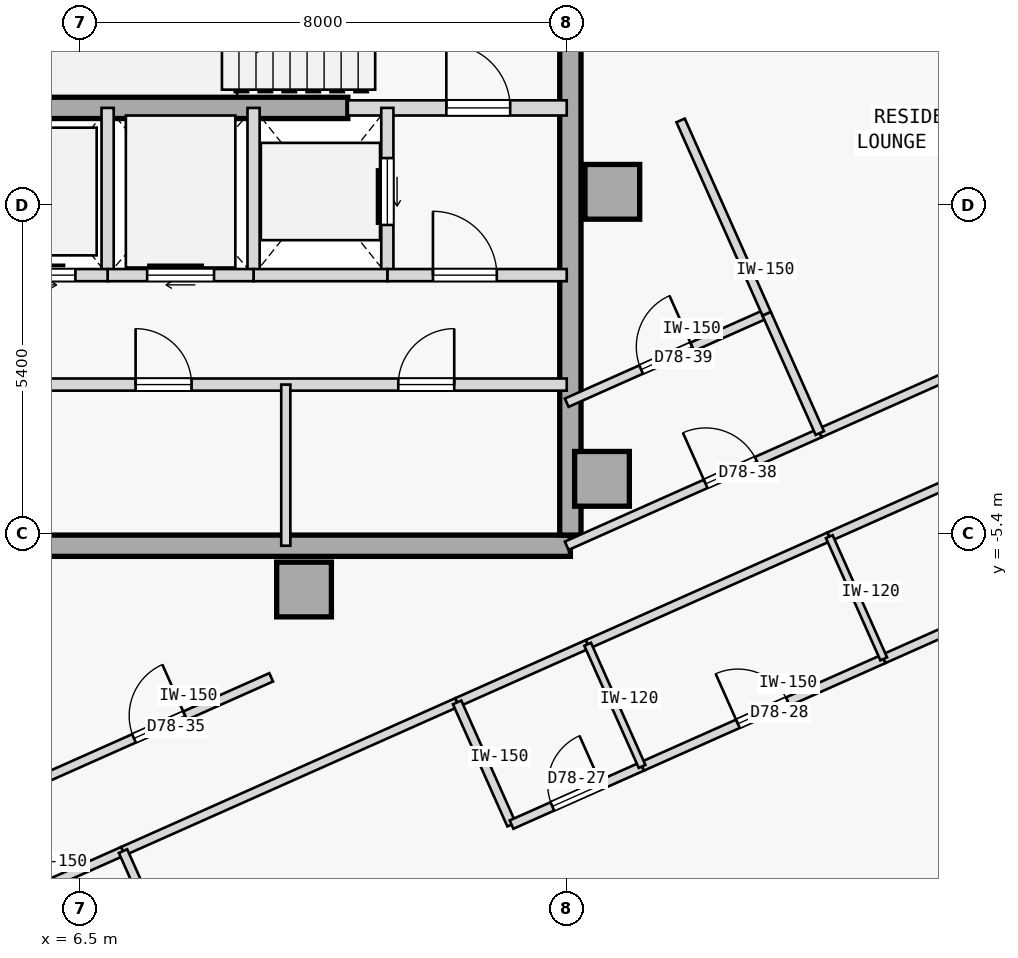
"""IFC4 building model, lengths in metres.
Left out: names, types, materials, properties, quantities, classifications, styles, units other than length and angle.
Written with IfcOpenShell. Run it as: python <this file> out.ifc"""

import sys

from ifc_helpers import new_model, si_unit, direction, frame, frame_2d, origin, origin_2d, place, context, subcontext, project, spatial, rectangle, extrude, element, fill, save


model = new_model("IFC4")
c1 = context("Model", 3, precision=1e-05, world=origin(), true_north=direction((0.0, 1.0)))
c2 = subcontext(c1, "Body", "Model", "MODEL_VIEW")
j1 = project(units=[si_unit("LENGTHUNIT", "METRE"), si_unit("PLANEANGLEUNIT", "RADIAN")], contexts=[c1])
p1 = place(None, origin())
s1 = spatial("IfcSite", under=j1, at=p1, CompositionType="ELEMENT")
p2 = place(p1, origin())
s2 = spatial("IfcBuilding", under=s1, at=p2, CompositionType="ELEMENT")
p3 = place(p2, frame((0.0, 0.0, 291.95)))
s3 = spatial("IfcBuildingStorey", under=s2, at=p3, CompositionType="ELEMENT", Elevation=291.95)
for number, where, z_axis, x_axis in (
    (1, (15.25, 0.22, 0.0), (0.0, 0.0, 1.0), (1.0, 0.0, 0.0)),
    (2, (15.08, -4.5, 0.0), (0.0, 0.0, 1.0), (1.0, 0.0, 0.0)),
    (3, (10.18, -6.32, 0.0), (0.0, 0.0, 1.0), (1.0, 0.0, 0.0)),
):
    element("IfcColumn", number, at=place(p3, frame(where, z_axis=z_axis, x_axis=x_axis)), inside=s3, PredefinedType="COLUMN", context=c2, shape_type="SweptSolid", body=[
        extrude(rectangle(XDim=0.9, YDim=0.9, at=origin_2d()), origin(), (0.0, 0.0, 1.0), 3.35),
    ])
p4 = place(p3, frame((3.7, -5.6, 0.0), z_axis=(0.0, 0.0, 1.0), x_axis=(1.0, 0.0, 0.0)))
e4 = element("IfcWall", 4, at=p4, inside=s3, PredefinedType="SHEAR", context=c2, shape_type="SweptSolid", body=[
    extrude(rectangle(XDim=10.86, YDim=0.35, at=frame_2d((5.43, 0.0))), origin(), (0.0, 0.0, 1.0), 3.125),
])
p5 = place(p3, frame((14.56, -5.425, 0.0), z_axis=(0.0, 0.0, 1.0), x_axis=(0.0, 1.0, 0.0)))
e5 = element("IfcWall", 5, at=p5, inside=s3, PredefinedType="SHEAR", context=c2, shape_type="SweptSolid", body=[
    extrude(rectangle(XDim=10.85, YDim=0.35, at=frame_2d((5.425, 0.0))), origin(), (0.0, 0.0, 1.0), 3.125),
])
p6 = place(p3, frame((5.75, 1.6, 0.0), z_axis=(0.0, 0.0, 1.0), x_axis=(1.0, 0.0, 0.0)))
e6 = element("IfcWall", 6, at=p6, inside=s3, PredefinedType="SHEAR", context=c2, shape_type="SweptSolid", body=[
    extrude(rectangle(XDim=5.15, YDim=0.35, at=frame_2d((2.575, 0.0))), origin(), (0.0, 0.0, 1.0), 3.125),
])
p7 = place(p3, frame((10.9, 1.6, 0.0), z_axis=(0.0, 0.0, 1.0), x_axis=(1.0, 0.0, 0.0)))
e7 = element("IfcWall", 7, at=p7, inside=s3, PredefinedType="STANDARD", context=c2, shape_type="SweptSolid", body=[
    extrude(rectangle(XDim=3.6, YDim=0.25, at=frame_2d((1.8, 0.0))), origin(), (0.0, 0.0, 1.0), 3.125),
])
p8 = place(p7, frame((1.62, 0.0, 0.0)))
e8 = element("IfcOpeningElement", 8, at=p8, cuts=e7, PredefinedType="OPENING", context=c2, shape_type="SweptSolid", body=[
    extrude(rectangle(XDim=1.05, YDim=2.15, at=frame_2d((0.525, 1.075))), frame((0.0, 0.135, 0.0), z_axis=(0.0, -1.0, 0.0), x_axis=(1.0, 0.0, 0.0)), (0.0, 0.0, 1.0), 0.27),
])
p9 = place(p3, frame((11.55, -1.15, 0.0), z_axis=(0.0, 0.0, 1.0), x_axis=(0.0, 1.0, 0.0)))
e9 = element("IfcWall", 9, at=p9, inside=s3, PredefinedType="STANDARD", context=c2, shape_type="SweptSolid", body=[
    extrude(rectangle(XDim=2.75, YDim=0.2, at=frame_2d((1.375, 0.0))), origin(), (0.0, 0.0, 1.0), 3.125),
])
p10 = place(p9, frame((0.825, 0.0, 0.0)))
e10 = element("IfcOpeningElement", 10, at=p10, cuts=e9, PredefinedType="OPENING", context=c2, shape_type="SweptSolid", body=[
    extrude(rectangle(XDim=1.1, YDim=2.15, at=frame_2d((0.55, 1.075))), frame((0.0, 0.11, 0.0), z_axis=(0.0, -1.0, 0.0), x_axis=(1.0, 0.0, 0.0)), (0.0, 0.0, 1.0), 0.22),
])
p11 = place(p3, frame((9.35, -1.15, 0.0), z_axis=(0.0, 0.0, 1.0), x_axis=(0.0, 1.0, 0.0)))
e11 = element("IfcWall", 11, at=p11, inside=s3, PredefinedType="STANDARD", context=c2, shape_type="SweptSolid", body=[
    extrude(rectangle(XDim=2.75, YDim=0.2, at=frame_2d((1.375, 0.0))), origin(), (0.0, 0.0, 1.0), 3.125),
])
p12 = place(p3, frame((11.55, -1.15, 0.0), z_axis=(0.0, 0.0, 1.0), x_axis=(1.0, 0.0, 0.0)))
e12 = element("IfcWall", 12, at=p12, inside=s3, PredefinedType="STANDARD", context=c2, shape_type="SweptSolid", body=[
    extrude(rectangle(XDim=2.95, YDim=0.2, at=frame_2d((1.475, 0.0))), origin(), (0.0, 0.0, 1.0), 3.125),
])
p13 = place(p12, frame((0.75, 0.0, 0.0)))
e13 = element("IfcOpeningElement", 13, at=p13, cuts=e12, PredefinedType="OPENING", context=c2, shape_type="SweptSolid", body=[
    extrude(rectangle(XDim=1.05, YDim=2.18, at=frame_2d((0.525, 1.09))), frame((0.0, 0.11, 0.0), z_axis=(0.0, -1.0, 0.0), x_axis=(1.0, 0.0, 0.0)), (0.0, 0.0, 1.0), 0.22),
])
p14 = place(p3, frame((9.35, -1.15, 0.0), z_axis=(0.0, 0.0, 1.0), x_axis=(1.0, 0.0, 0.0)))
e14 = element("IfcWall", 14, at=p14, inside=s3, PredefinedType="STANDARD", context=c2, shape_type="SweptSolid", body=[
    extrude(rectangle(XDim=2.2, YDim=0.2, at=frame_2d((1.1, 0.0))), origin(), (0.0, 0.0, 1.0), 3.125),
])
p15 = place(p3, frame((6.95, -1.15, 0.0), z_axis=(0.0, 0.0, 1.0), x_axis=(0.0, 1.0, 0.0)))
e15 = element("IfcWall", 15, at=p15, inside=s3, PredefinedType="STANDARD", context=c2, shape_type="SweptSolid", body=[
    extrude(rectangle(XDim=2.75, YDim=0.2, at=frame_2d((1.375, 0.0))), origin(), (0.0, 0.0, 1.0), 3.125),
])
p16 = place(p3, frame((6.95, -1.15, 0.0), z_axis=(0.0, 0.0, 1.0), x_axis=(1.0, 0.0, 0.0)))
e16 = element("IfcWall", 16, at=p16, inside=s3, PredefinedType="STANDARD", context=c2, shape_type="SweptSolid", body=[
    extrude(rectangle(XDim=2.4, YDim=0.2, at=frame_2d((1.2, 0.0))), origin(), (0.0, 0.0, 1.0), 3.125),
])
p17 = place(p16, frame((0.65, 0.0, 0.0)))
e17 = element("IfcOpeningElement", 17, at=p17, cuts=e16, PredefinedType="OPENING", context=c2, shape_type="SweptSolid", body=[
    extrude(rectangle(XDim=1.1, YDim=2.15, at=frame_2d((0.55, 1.075))), frame((0.0, 0.11, 0.0), z_axis=(0.0, -1.0, 0.0), x_axis=(1.0, 0.0, 0.0)), (0.0, 0.0, 1.0), 0.22),
])
p18 = place(p3, frame((4.79, -1.15, 0.0), z_axis=(0.0, 0.0, 1.0), x_axis=(1.0, 0.0, 0.0)))
e18 = element("IfcWall", 18, at=p18, inside=s3, PredefinedType="STANDARD", context=c2, shape_type="SweptSolid", body=[
    extrude(rectangle(XDim=2.16, YDim=0.2, at=frame_2d((1.08, 0.0))), origin(), (0.0, 0.0, 1.0), 3.125),
])
p19 = place(p18, frame((0.53, 0.0, 0.0)))
e19 = element("IfcOpeningElement", 19, at=p19, cuts=e18, PredefinedType="OPENING", context=c2, shape_type="SweptSolid", body=[
    extrude(rectangle(XDim=1.1, YDim=2.15, at=frame_2d((0.55, 1.075))), frame((0.0, 0.11, 0.0), z_axis=(0.0, -1.0, 0.0), x_axis=(1.0, 0.0, 0.0)), (0.0, 0.0, 1.0), 0.22),
])
p20 = place(p3, frame((3.7, -2.95, 0.0), z_axis=(0.0, 0.0, 1.0), x_axis=(1.0, 0.0, 0.0)))
e20 = element("IfcWall", 20, at=p20, inside=s3, PredefinedType="STANDARD", context=c2, shape_type="SweptSolid", body=[
    extrude(rectangle(XDim=10.8, YDim=0.2, at=frame_2d((5.4, 0.0))), origin(), (0.0, 0.0, 1.0), 3.125),
])
p21 = place(p20, frame((0.53, 0.0, 0.0)))
e21 = element("IfcOpeningElement", 21, at=p21, cuts=e20, PredefinedType="OPENING", context=c2, shape_type="SweptSolid", body=[
    extrude(rectangle(XDim=1.1, YDim=2.15, at=frame_2d((0.55, 1.075))), frame((0.0, 0.11, 0.0), z_axis=(0.0, -1.0, 0.0), x_axis=(1.0, 0.0, 0.0)), (0.0, 0.0, 1.0), 0.22),
])
p22 = place(p20, frame((3.71, 0.0, 0.0)))
e22 = element("IfcOpeningElement", 22, at=p22, cuts=e20, PredefinedType="OPENING", context=c2, shape_type="SweptSolid", body=[
    extrude(rectangle(XDim=0.92, YDim=2.15, at=frame_2d((0.46, 1.075))), frame((0.0, 0.11, 0.0), z_axis=(0.0, -1.0, 0.0), x_axis=(1.0, 0.0, 0.0)), (0.0, 0.0, 1.0), 0.22),
])
p23 = place(p20, frame((8.03, 0.0, 0.0)))
e23 = element("IfcOpeningElement", 23, at=p23, cuts=e20, PredefinedType="OPENING", context=c2, shape_type="SweptSolid", body=[
    extrude(rectangle(XDim=0.92, YDim=2.15, at=frame_2d((0.46, 1.075))), frame((0.0, 0.11, 0.0), z_axis=(0.0, -1.0, 0.0), x_axis=(1.0, 0.0, 0.0)), (0.0, 0.0, 1.0), 0.22),
])
p24 = place(p3, frame((9.88, -5.6, 0.0), z_axis=(0.0, 0.0, 1.0), x_axis=(0.0, 1.0, 0.0)))
e24 = element("IfcWall", 24, at=p24, inside=s3, PredefinedType="PARTITIONING", context=c2, shape_type="SweptSolid", body=[
    extrude(rectangle(XDim=2.65, YDim=0.15, at=frame_2d((1.325, 0.0))), origin(), (0.0, 0.0, 1.0), 3.125),
])
p25 = place(p3, frame((-4.445, -15.808, 0.0), z_axis=(0.0, 0.0, 1.0), x_axis=(0.913546853922, 0.406733506966, 0.0)))
e25 = element("IfcWall", 25, at=p25, inside=s3, PredefinedType="PARTITIONING", context=c2, shape_type="SweptSolid", body=[
    extrude(rectangle(XDim=12.751, YDim=0.15, at=frame_2d((6.375, 0.0))), origin(), (0.0, 0.0, 1.0), 3.125),
])
p26 = place(p25, frame((5.9, 0.0, 0.0)))
e26 = element("IfcOpeningElement", 26, at=p26, cuts=e25, PredefinedType="OPENING", context=c2, shape_type="SweptSolid", body=[
    extrude(rectangle(XDim=0.95, YDim=2.15, at=frame_2d((0.475, 1.075))), frame((0.0, 0.085, 0.0), z_axis=(0.0, -1.0, 0.0), x_axis=(1.0, 0.0, 0.0)), (0.0, 0.0, 1.0), 0.17),
])
p27 = place(p3, frame((7.204, -10.622, 0.0), z_axis=(0.0, 0.0, 1.0), x_axis=(0.913545172627, 0.406737283231, 0.0)))
e27 = element("IfcWall", 27, at=p27, inside=s3, PredefinedType="PARTITIONING", context=c2, shape_type="SweptSolid", body=[
    extrude(rectangle(XDim=6.014, YDim=0.15, at=frame_2d((3.007, 0.0))), origin(), (0.0, 0.0, 1.0), 3.125),
])
p28 = place(p3, frame((12.698, -8.176, 0.0), z_axis=(0.0, 0.0, 1.0), x_axis=(0.913558622212, 0.406707073682, 0.0)))
e28 = element("IfcWall", 28, at=p28, inside=s3, PredefinedType="PARTITIONING", context=c2, shape_type="SweptSolid", body=[
    extrude(rectangle(XDim=2.35, YDim=0.15, at=frame_2d((1.175, 0.0))), origin(), (0.0, 0.0, 1.0), 3.125),
])
p29 = place(p3, frame((14.844, -7.22, 0.0), z_axis=(0.0, 0.0, 1.0), x_axis=(0.913524337797, 0.406784075711, 0.0)))
e29 = element("IfcWall", 29, at=p29, inside=s3, PredefinedType="PARTITIONING", context=c2, shape_type="SweptSolid", body=[
    extrude(rectangle(XDim=4.35, YDim=0.15, at=frame_2d((2.175, 0.0))), origin(), (0.0, 0.0, 1.0), 3.125),
])
p30 = place(p3, frame((18.818, -5.451, 0.0), z_axis=(0.0, 0.0, 1.0), x_axis=(0.913538066796, 0.406753242783, 0.0)))
e30 = element("IfcWall", 30, at=p30, inside=s3, PredefinedType="PARTITIONING", context=c2, shape_type="SweptSolid", body=[
    extrude(rectangle(XDim=3.5, YDim=0.15, at=frame_2d((1.75, 0.0))), origin(), (0.0, 0.0, 1.0), 3.125),
])
p31 = place(p3, frame((5.968, -9.399, 0.0), z_axis=(0.0, 0.0, 1.0), x_axis=(0.913563383118, 0.406696379412, 0.0)))
e31 = element("IfcWall", 31, at=p31, inside=s3, PredefinedType="PARTITIONING", context=c2, shape_type="SweptSolid", body=[
    extrude(rectangle(XDim=4.019, YDim=0.15, at=frame_2d((2.01, 0.0))), origin(), (0.0, 0.0, 1.0), 3.125),
])
p32 = place(p31, frame((1.55, 0.0, 0.0)))
e32 = element("IfcOpeningElement", 32, at=p32, cuts=e31, PredefinedType="OPENING", context=c2, shape_type="SweptSolid", body=[
    extrude(rectangle(XDim=0.92, YDim=2.15, at=frame_2d((0.46, 1.075))), frame((0.0, 0.085, 0.0), z_axis=(0.0, -1.0, 0.0), x_axis=(1.0, 0.0, 0.0)), (0.0, 0.0, 1.0), 0.17),
])
p33 = place(p3, frame((14.5, -5.6, 0.0), z_axis=(0.0, 0.0, 1.0), x_axis=(0.913550607208, 0.406725076766, 0.0)))
e33 = element("IfcWall", 33, at=p33, inside=s3, PredefinedType="PARTITIONING", context=c2, shape_type="SweptSolid", body=[
    extrude(rectangle(XDim=4.556, YDim=0.15, at=frame_2d((2.278, 0.0))), origin(), (0.0, 0.0, 1.0), 3.125),
])
p34 = place(p33, frame((2.501, 0.0, 0.0)))
e34 = element("IfcOpeningElement", 34, at=p34, cuts=e33, PredefinedType="OPENING", context=c2, shape_type="SweptSolid", body=[
    extrude(rectangle(XDim=0.92, YDim=2.15, at=frame_2d((0.46, 1.075))), frame((0.0, 0.085, 0.0), z_axis=(0.0, -1.0, 0.0), x_axis=(1.0, 0.0, 0.0)), (0.0, 0.0, 1.0), 0.17),
])
p35 = place(p3, frame((18.662, -3.747, 0.0), z_axis=(0.0, 0.0, 1.0), x_axis=(0.913544622417, 0.406738519018, 0.0)))
e35 = element("IfcWall", 35, at=p35, inside=s3, PredefinedType="PARTITIONING", context=c2, shape_type="SweptSolid", body=[
    extrude(rectangle(XDim=14.192, YDim=0.15, at=frame_2d((7.096, 0.0))), origin(), (0.0, 0.0, 1.0), 3.125),
])
p36 = place(p35, frame((6.636, 0.0, 0.0)))
e36 = element("IfcOpeningElement", 36, at=p36, cuts=e35, PredefinedType="OPENING", context=c2, shape_type="SweptSolid", body=[
    extrude(rectangle(XDim=0.92, YDim=2.15, at=frame_2d((0.46, 1.075))), frame((0.0, 0.085, 0.0), z_axis=(0.0, -1.0, 0.0), x_axis=(1.0, 0.0, 0.0)), (0.0, 0.0, 1.0), 0.17),
])
p37 = place(p3, frame((11.082, -19.333, 0.0), z_axis=(0.0, 0.0, 1.0), x_axis=(-0.406729927653, 0.913548447512, 0.0)))
e37 = element("IfcWall", 37, at=p37, inside=s3, PredefinedType="PARTITIONING", context=c2, shape_type="SweptSolid", body=[
    extrude(rectangle(XDim=9.535, YDim=0.15, at=frame_2d((4.768, 0.0))), origin(), (0.0, 0.0, 1.0), 3.125),
])
p38 = place(p3, frame((13.592, -10.186, 0.0), z_axis=(0.0, 0.0, 1.0), x_axis=(-0.406725294076, 0.913550510459, 0.0)))
e38 = element("IfcWall", 38, at=p38, inside=s3, PredefinedType="PARTITIONING", context=c2, shape_type="SweptSolid", body=[
    extrude(rectangle(XDim=2.2, YDim=0.15, at=frame_2d((1.1, 0.0))), origin(), (0.0, 0.0, 1.0), 3.125),
])
p39 = place(p3, frame((13.592, -10.186, 0.0), z_axis=(0.0, 0.0, 1.0), x_axis=(0.913558622212, 0.406707073682, 0.0)))
e39 = element("IfcWall", 39, at=p39, inside=s3, PredefinedType="PARTITIONING", context=c2, shape_type="SweptSolid", body=[
    extrude(rectangle(XDim=2.35, YDim=0.15, at=frame_2d((1.175, 0.0))), origin(), (0.0, 0.0, 1.0), 3.125),
])
p40 = place(p39, frame((0.735, 0.0, 0.0)))
e40 = element("IfcOpeningElement", 40, at=p40, cuts=e39, PredefinedType="OPENING", context=c2, shape_type="SweptSolid", body=[
    extrude(rectangle(XDim=0.88, YDim=2.15, at=frame_2d((0.44, 1.075))), frame((0.0, 0.085, 0.0), z_axis=(0.0, -1.0, 0.0), x_axis=(1.0, 0.0, 0.0)), (0.0, 0.0, 1.0), 0.17),
])
p41 = place(p3, frame((15.739, -9.23, 0.0), z_axis=(0.0, 0.0, 1.0), x_axis=(0.913545193015, 0.406737237438, 0.0)))
e41 = element("IfcWall", 41, at=p41, inside=s3, PredefinedType="PARTITIONING", context=c2, shape_type="SweptSolid", body=[
    extrude(rectangle(XDim=4.35, YDim=0.15, at=frame_2d((2.175, 0.0))), origin(), (0.0, 0.0, 1.0), 3.125),
])
p42 = place(p41, frame((1.725, 0.0, 0.0)))
e42 = element("IfcOpeningElement", 42, at=p42, cuts=e41, PredefinedType="OPENING", context=c2, shape_type="SweptSolid", body=[
    extrude(rectangle(XDim=0.9, YDim=2.15, at=frame_2d((0.45, 1.075))), frame((0.0, 0.085, 0.0), z_axis=(0.0, -1.0, 0.0), x_axis=(1.0, 0.0, 0.0)), (0.0, 0.0, 1.0), 0.17),
])
p43 = place(p3, frame((19.713, -7.461, 0.0), z_axis=(0.0, 0.0, 1.0), x_axis=(0.913549606868, 0.406727323635, 0.0)))
e43 = element("IfcWall", 43, at=p43, inside=s3, PredefinedType="PARTITIONING", context=c2, shape_type="SweptSolid", body=[
    extrude(rectangle(XDim=3.5, YDim=0.15, at=frame_2d((1.75, 0.0))), origin(), (0.0, 0.0, 1.0), 3.125),
])
p44 = place(p43, frame((1.31, 0.0, 0.0)))
e44 = element("IfcOpeningElement", 44, at=p44, cuts=e43, PredefinedType="OPENING", context=c2, shape_type="SweptSolid", body=[
    extrude(rectangle(XDim=0.88, YDim=2.15, at=frame_2d((0.44, 1.075))), frame((0.0, 0.085, 0.0), z_axis=(0.0, -1.0, 0.0), x_axis=(1.0, 0.0, 0.0)), (0.0, 0.0, 1.0), 0.17),
])
p45 = place(p3, frame((15.739, -9.23, 0.0), z_axis=(0.0, 0.0, 1.0), x_axis=(-0.406725294076, 0.913550510459, 0.0)))
e45 = element("IfcWall", 45, at=p45, inside=s3, PredefinedType="PARTITIONING", context=c2, shape_type="SweptSolid", body=[
    extrude(rectangle(XDim=2.2, YDim=0.12, at=frame_2d((1.1, 0.0))), origin(), (0.0, 0.0, 1.0), 3.125),
])
p46 = place(p3, frame((19.713, -7.461, 0.0), z_axis=(0.0, 0.0, 1.0), x_axis=(-0.406684063321, 0.913568865845, 0.0)))
e46 = element("IfcWall", 46, at=p46, inside=s3, PredefinedType="PARTITIONING", context=c2, shape_type="SweptSolid", body=[
    extrude(rectangle(XDim=2.2, YDim=0.12, at=frame_2d((1.1, 0.0))), origin(), (0.0, 0.0, 1.0), 3.125),
])
p47 = place(p3, frame((14.5, -3.248, 0.0), z_axis=(0.0, 0.0, 1.0), x_axis=(0.913542803573, 0.40674260416, 0.0)))
e47 = element("IfcWall", 47, at=p47, inside=s3, PredefinedType="PARTITIONING", context=c2, shape_type="SweptSolid", body=[
    extrude(rectangle(XDim=3.599, YDim=0.15, at=frame_2d((1.8, 0.0))), origin(), (0.0, 0.0, 1.0), 3.125),
])
p48 = place(p47, frame((1.34, 0.0, 0.0)))
e48 = element("IfcOpeningElement", 48, at=p48, cuts=e47, PredefinedType="OPENING", context=c2, shape_type="SweptSolid", body=[
    extrude(rectangle(XDim=0.92, YDim=2.15, at=frame_2d((0.46, 1.075))), frame((0.0, 0.085, 0.0), z_axis=(0.0, -1.0, 0.0), x_axis=(1.0, 0.0, 0.0)), (0.0, 0.0, 1.0), 0.17),
])
p49 = place(p3, frame((18.662, -3.747, 0.0), z_axis=(0.0, 0.0, 1.0), x_axis=(-0.406686481677, 0.913567789286, 0.0)))
e49 = element("IfcWall", 49, at=p49, inside=s3, PredefinedType="PARTITIONING", context=c2, shape_type="SweptSolid", body=[
    extrude(rectangle(XDim=2.149, YDim=0.15, at=frame_2d((1.075, 0.0))), origin(), (0.0, 0.0, 1.0), 3.125),
])
p50 = place(p3, frame((17.788, -1.784, 0.0), z_axis=(0.0, 0.0, 1.0), x_axis=(-0.40673740295, 0.913545119324, 0.0)))
e50 = element("IfcWall", 50, at=p50, inside=s3, PredefinedType="PARTITIONING", context=c2, shape_type="SweptSolid", body=[
    extrude(rectangle(XDim=3.479, YDim=0.15, at=frame_2d((1.74, 0.0))), origin(), (0.0, 0.0, 1.0), 3.125),
])
p51 = place(p8, origin())
e51 = element("IfcDoor", 51, at=p51, inside=s3, OperationType="SINGLE_SWING_LEFT", PredefinedType="DOOR", context=c2, shape_type="SweptSolid", body=[
    extrude(rectangle(XDim=1.05, YDim=2.15, at=frame_2d((0.525, 1.075))), frame((0.0, 0.025, 0.0), z_axis=(0.0, -1.0, 0.0), x_axis=(1.0, 0.0, 0.0)), (0.0, 0.0, 1.0), 0.05),
])
fill(e8, e51)
p52 = place(p13, origin())
e52 = element("IfcDoor", 52, at=p52, inside=s3, OperationType="SINGLE_SWING_LEFT", PredefinedType="DOOR", context=c2, shape_type="SweptSolid", body=[
    extrude(rectangle(XDim=1.05, YDim=2.18, at=frame_2d((0.525, 1.09))), frame((0.0, 0.025, 0.0), z_axis=(0.0, -1.0, 0.0), x_axis=(1.0, 0.0, 0.0)), (0.0, 0.0, 1.0), 0.05),
])
fill(e13, e52)
p53 = place(p10, origin())
e53 = element("IfcDoor", 53, at=p53, inside=s3, OperationType="SLIDING_TO_RIGHT", PredefinedType="DOOR", context=c2, shape_type="SweptSolid", body=[
    extrude(rectangle(XDim=1.1, YDim=2.15, at=frame_2d((0.55, 1.075))), frame((0.0, 0.025, 0.0), z_axis=(0.0, -1.0, 0.0), x_axis=(1.0, 0.0, 0.0)), (0.0, 0.0, 1.0), 0.05),
])
fill(e10, e53)
p54 = place(p17, origin())
e54 = element("IfcDoor", 54, at=p54, inside=s3, OperationType="SLIDING_TO_RIGHT", PredefinedType="DOOR", context=c2, shape_type="SweptSolid", body=[
    extrude(rectangle(XDim=1.1, YDim=2.15, at=frame_2d((0.55, 1.075))), frame((0.0, 0.025, 0.0), z_axis=(0.0, -1.0, 0.0), x_axis=(1.0, 0.0, 0.0)), (0.0, 0.0, 1.0), 0.05),
])
fill(e17, e54)
p55 = place(p19, origin())
e55 = element("IfcDoor", 55, at=p55, inside=s3, OperationType="SLIDING_TO_LEFT", PredefinedType="DOOR", context=c2, shape_type="SweptSolid", body=[
    extrude(rectangle(XDim=1.1, YDim=2.15, at=frame_2d((0.55, 1.075))), frame((0.0, 0.025, 0.0), z_axis=(0.0, -1.0, 0.0), x_axis=(1.0, 0.0, 0.0)), (0.0, 0.0, 1.0), 0.05),
])
fill(e19, e55)
p56 = place(p22, origin())
e56 = element("IfcDoor", 56, at=p56, inside=s3, OperationType="SINGLE_SWING_LEFT", PredefinedType="DOOR", context=c2, shape_type="SweptSolid", body=[
    extrude(rectangle(XDim=0.92, YDim=2.15, at=frame_2d((0.46, 1.075))), frame((0.0, 0.025, 0.0), z_axis=(0.0, -1.0, 0.0), x_axis=(1.0, 0.0, 0.0)), (0.0, 0.0, 1.0), 0.05),
])
fill(e22, e56)
p57 = place(p23, origin())
e57 = element("IfcDoor", 57, at=p57, inside=s3, OperationType="SINGLE_SWING_RIGHT", PredefinedType="DOOR", context=c2, shape_type="SweptSolid", body=[
    extrude(rectangle(XDim=0.92, YDim=2.15, at=frame_2d((0.46, 1.075))), frame((0.0, 0.025, 0.0), z_axis=(0.0, -1.0, 0.0), x_axis=(1.0, 0.0, 0.0)), (0.0, 0.0, 1.0), 0.05),
])
fill(e23, e57)
p58 = place(p40, origin())
e58 = element("IfcDoor", 58, at=p58, inside=s3, OperationType="SINGLE_SWING_RIGHT", PredefinedType="DOOR", context=c2, shape_type="SweptSolid", body=[
    extrude(rectangle(XDim=0.88, YDim=2.15, at=frame_2d((0.44, 1.075))), frame((0.0, 0.025, 0.0), z_axis=(0.0, -1.0, 0.0), x_axis=(1.0, 0.0, 0.0)), (0.0, 0.0, 1.0), 0.05),
])
fill(e40, e58)
p59 = place(p42, origin())
e59 = element("IfcDoor", 59, at=p59, inside=s3, OperationType="SINGLE_SWING_LEFT", PredefinedType="DOOR", context=c2, shape_type="SweptSolid", body=[
    extrude(rectangle(XDim=0.9, YDim=2.15, at=frame_2d((0.45, 1.075))), frame((0.0, 0.025, 0.0), z_axis=(0.0, -1.0, 0.0), x_axis=(1.0, 0.0, 0.0)), (0.0, 0.0, 1.0), 0.05),
])
fill(e42, e59)
p60 = place(p32, origin())
e60 = element("IfcDoor", 60, at=p60, inside=s3, OperationType="SINGLE_SWING_RIGHT", PredefinedType="DOOR", context=c2, shape_type="SweptSolid", body=[
    extrude(rectangle(XDim=0.92, YDim=2.15, at=frame_2d((0.46, 1.075))), frame((0.0, 0.025, 0.0), z_axis=(0.0, -1.0, 0.0), x_axis=(1.0, 0.0, 0.0)), (0.0, 0.0, 1.0), 0.05),
])
fill(e32, e60)
p61 = place(p34, origin())
e61 = element("IfcDoor", 61, at=p61, inside=s3, OperationType="SINGLE_SWING_LEFT", PredefinedType="DOOR", context=c2, shape_type="SweptSolid", body=[
    extrude(rectangle(XDim=0.92, YDim=2.15, at=frame_2d((0.46, 1.075))), frame((0.0, 0.025, 0.0), z_axis=(0.0, -1.0, 0.0), x_axis=(1.0, 0.0, 0.0)), (0.0, 0.0, 1.0), 0.05),
])
fill(e34, e61)
p62 = place(p48, origin())
e62 = element("IfcDoor", 62, at=p62, inside=s3, OperationType="SINGLE_SWING_RIGHT", PredefinedType="DOOR", context=c2, shape_type="SweptSolid", body=[
    extrude(rectangle(XDim=0.92, YDim=2.15, at=frame_2d((0.46, 1.075))), frame((0.0, 0.025, 0.0), z_axis=(0.0, -1.0, 0.0), x_axis=(1.0, 0.0, 0.0)), (0.0, 0.0, 1.0), 0.05),
])
fill(e48, e62)
save(model, sys.argv[1])
